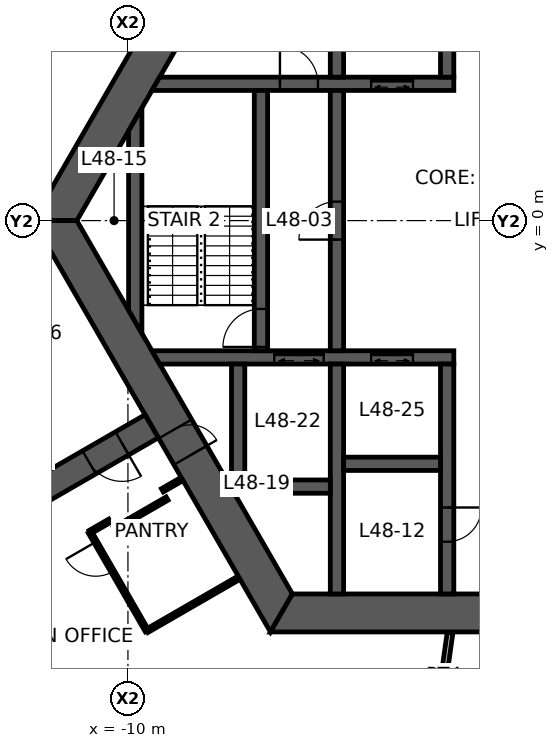
"""IFC4 building model, lengths in metres.
Left out: names, types, materials, properties, quantities, classifications, styles, units other than length and angle.
Written with IfcOpenShell. Run it as: python <this file> out.ifc"""

import sys

from ifc_helpers import new_model, si_unit, direction, frame, frame_2d, origin, place, context, subcontext, project, spatial, polyline, rectangle, outline, extrude, element, fill, save


model = new_model("IFC4")
c1 = context("Model", 3, precision=1e-05, world=origin(), true_north=direction((0.0, 1.0)))
c2 = subcontext(c1, "Body", "Model", "MODEL_VIEW")
j1 = project(units=[si_unit("LENGTHUNIT", "METRE"), si_unit("PLANEANGLEUNIT", "RADIAN")], contexts=[c1])
p1 = place(None, origin())
s1 = spatial("IfcSite", under=j1, at=p1, CompositionType="ELEMENT")
p2 = place(p1, origin())
s2 = spatial("IfcBuilding", under=s1, at=p2, CompositionType="ELEMENT")
p3 = place(p2, frame((0.0, 0.0, 191.6)))
s3 = spatial("IfcBuildingStorey", under=s2, at=p3, CompositionType="ELEMENT", Elevation=191.6)
p4 = place(p3, frame((-5.961, 10.325, 0.0), z_axis=(0.0, 0.0, 1.0), x_axis=(-0.500004296715, -0.866022923061, 0.0)))
e1 = element("IfcWall", 1, at=p4, inside=s3, PredefinedType="SHEAR", context=c2, shape_type="SweptSolid", body=[
    extrude(outline(polyline([(-0.289, -0.5), (4.494, -0.5), (5.494, -0.5), (12.211, -0.5), (11.634, 0.5), (5.494, 0.5), (4.494, 0.5), (0.289, 0.5), (-0.289, -0.5)])), origin(), (0.0, 0.0, 1.0), 3.9),
])
p5 = place(p4, frame((4.494, 0.0, 0.0)))
e2 = element("IfcOpeningElement", 2, at=p5, cuts=e1, PredefinedType="OPENING", context=c2, shape_type="SweptSolid", body=[
    extrude(rectangle(XDim=1.0, YDim=2.1, at=frame_2d((0.5, 1.05))), frame((0.0, 0.51, 0.0), z_axis=(0.0, -1.0, 0.0), x_axis=(1.0, 0.0, 0.0)), (0.0, 0.0, 1.0), 1.02),
])
p6 = place(p3, frame((-11.922, 0.0, 0.0), z_axis=(0.0, 0.0, 1.0), x_axis=(0.500004296715, -0.866022923061, 0.0)))
e3 = element("IfcWall", 3, at=p6, inside=s3, PredefinedType="SHEAR", context=c2, shape_type="SweptSolid", body=[
    extrude(outline(polyline([(-0.289, -0.5), (6.331, -0.5), (7.131, -0.5), (12.211, -0.5), (11.634, 0.5), (7.131, 0.5), (6.331, 0.5), (0.289, 0.5), (-0.289, -0.5)])), origin(), (0.0, 0.0, 1.0), 3.9),
])
p7 = place(p6, frame((6.331, 0.0, 0.0)))
e4 = element("IfcOpeningElement", 4, at=p7, cuts=e3, PredefinedType="OPENING", context=c2, shape_type="SweptSolid", body=[
    extrude(rectangle(XDim=0.8, YDim=2.1, at=frame_2d((0.4, 1.05))), frame((0.0, 0.51, 0.0), z_axis=(0.0, -1.0, 0.0), x_axis=(1.0, 0.0, 0.0)), (0.0, 0.0, 1.0), 1.02),
])
p8 = place(p3, frame((-5.961, -10.325, 0.0), z_axis=(0.0, 0.0, 1.0), x_axis=(1.0, 0.0, 0.0)))
e5 = element("IfcWall", 5, at=p8, inside=s3, PredefinedType="SHEAR", context=c2, shape_type="SweptSolid", body=[
    extrude(outline(polyline([(-0.289, -0.5), (5.461, -0.5), (6.461, -0.5), (12.211, -0.5), (11.634, 0.5), (6.461, 0.5), (5.461, 0.5), (0.289, 0.5), (-0.289, -0.5)])), origin(), (0.0, 0.0, 1.0), 3.9),
])
p9 = place(p8, frame((5.461, 0.0, 0.0)))
e6 = element("IfcOpeningElement", 6, at=p9, cuts=e5, PredefinedType="OPENING", context=c2, shape_type="SweptSolid", body=[
    extrude(rectangle(XDim=1.0, YDim=2.1, at=frame_2d((0.5, 1.05))), frame((0.0, 0.51, 0.0), z_axis=(0.0, -1.0, 0.0), x_axis=(1.0, 0.0, 0.0)), (0.0, 0.0, 1.0), 1.02),
])
p10 = place(p3, frame((-9.375, -5.413, 0.0), z_axis=(0.0, 0.0, 1.0), x_axis=(-0.866032377459, -0.499987921047, 0.0)))
e7 = element("IfcWall", 7, at=p10, inside=s3, PredefinedType="SHEAR", context=c2, shape_type="SweptSolid", body=[
    extrude(rectangle(XDim=7.696, YDim=0.7, at=frame_2d((3.848, 0.0))), origin(), (0.0, 0.0, 1.0), 3.9),
])
p11 = place(p10, frame((0.9, 0.0, 0.0)))
e8 = element("IfcOpeningElement", 8, at=p11, cuts=e7, PredefinedType="OPENING", context=c2, shape_type="SweptSolid", body=[
    extrude(rectangle(XDim=1.0, YDim=2.1, at=frame_2d((0.5, 1.05))), frame((0.0, 0.36, 0.0), z_axis=(0.0, -1.0, 0.0), x_axis=(1.0, 0.0, 0.0)), (0.0, 0.0, 1.0), 0.72),
])
p12 = place(p3, frame((-9.266, 3.6, 0.0), z_axis=(0.0, 0.0, 1.0), x_axis=(1.0, 0.0, 0.0)))
e9 = element("IfcWall", 9, at=p12, inside=s3, PredefinedType="SHEAR", context=c2, shape_type="SweptSolid", body=[
    extrude(outline(polyline([(-0.101, -0.175), (3.266, -0.175), (4.266, -0.175), (5.667, -0.175), (6.767, -0.175), (7.841, -0.175), (7.841, 0.175), (6.767, 0.175), (5.667, 0.175), (4.266, 0.175), (3.266, 0.175), (0.101, 0.175), (-0.101, -0.175)])), origin(), (0.0, 0.0, 1.0), 3.9),
])
p13 = place(p12, frame((3.266, 0.0, 0.0)))
e10 = element("IfcOpeningElement", 10, at=p13, cuts=e9, PredefinedType="OPENING", context=c2, shape_type="SweptSolid", body=[
    extrude(rectangle(XDim=1.0, YDim=2.1, at=frame_2d((0.5, 1.05))), frame((0.0, 0.185, 0.0), z_axis=(0.0, -1.0, 0.0), x_axis=(1.0, 0.0, 0.0)), (0.0, 0.0, 1.0), 0.37),
])
p14 = place(p12, frame((5.667, 0.0, 0.0)))
e11 = element("IfcOpeningElement", 11, at=p14, cuts=e9, PredefinedType="OPENING", context=c2, shape_type="SweptSolid", body=[
    extrude(rectangle(XDim=1.1, YDim=2.1, at=frame_2d((0.55, 1.05))), frame((0.0, 0.185, 0.0), z_axis=(0.0, -1.0, 0.0), x_axis=(1.0, 0.0, 0.0)), (0.0, 0.0, 1.0), 0.37),
])
p15 = place(p3, frame((-9.266, -3.6, 0.0), z_axis=(0.0, 0.0, 1.0), x_axis=(1.0, 0.0, 0.0)))
e12 = element("IfcWall", 12, at=p15, inside=s3, PredefinedType="SHEAR", context=c2, shape_type="SweptSolid", body=[
    extrude(outline(polyline([(0.101, -0.175), (3.116, -0.175), (4.417, -0.175), (5.667, -0.175), (6.767, -0.175), (7.841, -0.175), (7.841, 0.175), (6.767, 0.175), (5.667, 0.175), (4.417, 0.175), (3.116, 0.175), (-0.101, 0.175), (0.101, -0.175)])), origin(), (0.0, 0.0, 1.0), 3.9),
])
p16 = place(p15, frame((5.667, 0.0, 0.0)))
e13 = element("IfcOpeningElement", 13, at=p16, cuts=e12, PredefinedType="OPENING", context=c2, shape_type="SweptSolid", body=[
    extrude(rectangle(XDim=1.1, YDim=2.1, at=frame_2d((0.55, 1.05))), frame((0.0, 0.185, 0.0), z_axis=(0.0, -1.0, 0.0), x_axis=(1.0, 0.0, 0.0)), (0.0, 0.0, 1.0), 0.37),
])
p17 = place(p15, frame((3.116, 0.0, 0.0)))
e14 = element("IfcOpeningElement", 14, at=p17, cuts=e12, PredefinedType="OPENING", context=c2, shape_type="SweptSolid", body=[
    extrude(rectangle(XDim=1.3, YDim=2.1, at=frame_2d((0.65, 1.05))), frame((0.0, 0.185, 0.0), z_axis=(0.0, -1.0, 0.0), x_axis=(1.0, 0.0, 0.0)), (0.0, 0.0, 1.0), 0.37),
])
p18 = place(p3, frame((-1.6, 3.775, 0.0), z_axis=(0.0, 0.0, 1.0), x_axis=(0.0, 1.0, 0.0)))
e15 = element("IfcWall", 15, at=p18, inside=s3, PredefinedType="SHEAR", context=c2, shape_type="SweptSolid", body=[
    extrude(rectangle(XDim=6.05, YDim=0.35, at=frame_2d((3.025, 0.0))), origin(), (0.0, 0.0, 1.0), 3.9),
])
p19 = place(p18, frame((3.775, 0.0, 0.0)))
e16 = element("IfcOpeningElement", 16, at=p19, cuts=e15, PredefinedType="OPENING", context=c2, shape_type="SweptSolid", body=[
    extrude(rectangle(XDim=0.9, YDim=2.1, at=frame_2d((0.45, 1.05))), frame((0.0, 0.185, 0.0), z_axis=(0.0, -1.0, 0.0), x_axis=(1.0, 0.0, 0.0)), (0.0, 0.0, 1.0), 0.37),
])
p20 = place(p3, frame((-1.6, -3.775, 0.0), z_axis=(0.0, 0.0, 1.0), x_axis=(0.0, -1.0, 0.0)))
e17 = element("IfcWall", 17, at=p20, inside=s3, PredefinedType="SHEAR", context=c2, shape_type="SweptSolid", body=[
    extrude(rectangle(XDim=6.05, YDim=0.35, at=frame_2d((3.025, 0.0))), origin(), (0.0, 0.0, 1.0), 3.9),
])
p21 = place(p20, frame((3.775, 0.0, 0.0)))
e18 = element("IfcOpeningElement", 18, at=p21, cuts=e17, PredefinedType="OPENING", context=c2, shape_type="SweptSolid", body=[
    extrude(rectangle(XDim=0.9, YDim=2.1, at=frame_2d((0.45, 1.05))), frame((0.0, 0.185, 0.0), z_axis=(0.0, -1.0, 0.0), x_axis=(1.0, 0.0, 0.0)), (0.0, 0.0, 1.0), 0.37),
])
p22 = place(p3, frame((-4.5, -3.425, 0.0), z_axis=(0.0, 0.0, 1.0), x_axis=(0.0, 1.0, 0.0)))
e19 = element("IfcWall", 19, at=p22, inside=s3, PredefinedType="SHEAR", context=c2, shape_type="SweptSolid", body=[
    extrude(rectangle(XDim=6.85, YDim=0.35, at=frame_2d((3.425, 0.0))), origin(), (0.0, 0.0, 1.0), 3.9),
])
p23 = place(p22, frame((2.925, 0.0, 0.0)))
e20 = element("IfcOpeningElement", 20, at=p23, cuts=e19, PredefinedType="OPENING", context=c2, shape_type="SweptSolid", body=[
    extrude(rectangle(XDim=1.0, YDim=2.1, at=frame_2d((0.5, 1.05))), frame((0.0, 0.185, 0.0), z_axis=(0.0, -1.0, 0.0), x_axis=(1.0, 0.0, 0.0)), (0.0, 0.0, 1.0), 0.37),
])
p24 = place(p3, frame((-6.5, -3.425, 0.0), z_axis=(0.0, 0.0, 1.0), x_axis=(0.0, 1.0, 0.0)))
e21 = element("IfcWall", 21, at=p24, inside=s3, PredefinedType="SHEAR", context=c2, shape_type="SweptSolid", body=[
    extrude(rectangle(XDim=6.85, YDim=0.35, at=frame_2d((3.425, 0.0))), origin(), (0.0, 0.0, 1.0), 3.9),
])
p25 = place(p24, frame((0.1, 0.0, 0.0)))
e22 = element("IfcOpeningElement", 22, at=p25, cuts=e21, PredefinedType="OPENING", context=c2, shape_type="SweptSolid", body=[
    extrude(rectangle(XDim=1.0, YDim=2.1, at=frame_2d((0.5, 1.05))), frame((0.0, 0.185, 0.0), z_axis=(0.0, -1.0, 0.0), x_axis=(1.0, 0.0, 0.0)), (0.0, 0.0, 1.0), 0.37),
])
for number, where, z_axis, x_axis in (
    (23, (-4.5, 3.775, 0.0), (0.0, 0.0, 1.0), (0.0, 1.0, 0.0)),
    (24, (-4.5, -3.775, 0.0), (0.0, 0.0, 1.0), (0.0, -1.0, 0.0)),
):
    element("IfcWall", number, at=place(p3, frame(where, z_axis=z_axis, x_axis=x_axis)), inside=s3, PredefinedType="SHEAR", context=c2, shape_type="SweptSolid", body=[
        extrude(rectangle(XDim=6.05, YDim=0.35, at=frame_2d((3.025, 0.0))), origin(), (0.0, 0.0, 1.0), 3.9),
    ])
p26 = place(p3, frame((-4.325, -6.4, 0.0), z_axis=(0.0, 0.0, 1.0), x_axis=(1.0, 0.0, 0.0)))
e25 = element("IfcWall", 25, at=p26, inside=s3, PredefinedType="SHEAR", context=c2, shape_type="SweptSolid", body=[
    extrude(rectangle(XDim=2.55, YDim=0.35, at=frame_2d((1.275, 0.0))), origin(), (0.0, 0.0, 1.0), 3.9),
])
p27 = place(p3, frame((-6.925, -7.0, 0.0), z_axis=(0.0, 0.0, 1.0), x_axis=(1.0, 0.0, 0.0)))
e26 = element("IfcWall", 26, at=p27, inside=s3, PredefinedType="SHEAR", context=c2, shape_type="SweptSolid", body=[
    extrude(rectangle(XDim=2.25, YDim=0.35, at=frame_2d((1.125, 0.0))), origin(), (0.0, 0.0, 1.0), 3.9),
])
p28 = place(p3, frame((-7.1, -3.775, 0.0), z_axis=(0.0, 0.0, 1.0), x_axis=(0.0, -1.0, 0.0)))
e27 = element("IfcWall", 27, at=p28, inside=s3, PredefinedType="SHEAR", context=c2, shape_type="SweptSolid", body=[
    extrude(outline(polyline([(0.0, -0.175), (3.274, -0.175), (3.4, 0.0), (3.4, 0.175), (0.0, 0.175), (0.0, -0.175)])), origin(), (0.0, 0.0, 1.0), 3.9),
])
p29 = place(p3, frame((-9.808, -2.662, 0.0), z_axis=(0.0, 0.0, 1.0), x_axis=(0.0, 1.0, 0.0)))
e28 = element("IfcWall", 28, at=p29, inside=s3, PredefinedType="SHEAR", context=c2, shape_type="SweptSolid", body=[
    extrude(outline(polyline([(-0.303, -0.175), (5.628, -0.175), (5.021, 0.175), (0.303, 0.175), (-0.303, -0.175)])), origin(), (0.0, 0.0, 1.0), 3.9),
])
p30 = place(p3, frame((-15.156, 0.0, 0.0), z_axis=(0.0, 0.0, 1.0), x_axis=(0.500012970505, 0.86601791513, 0.0)))
e29 = element("IfcWall", 29, at=p30, inside=s3, PredefinedType="PARTITIONING", context=c2, shape_type="SweptSolid", body=[
    extrude(rectangle(XDim=11.591, YDim=0.15, at=frame_2d((5.795, 0.0))), origin(), (0.0, 0.0, 1.0), 2.95),
])
p31 = place(p30, frame((5.295, 0.0, 0.0)))
e30 = element("IfcOpeningElement", 30, at=p31, cuts=e29, PredefinedType="OPENING", context=c2, shape_type="SweptSolid", body=[
    extrude(rectangle(XDim=1.0, YDim=2.1, at=frame_2d((0.5, 1.05))), frame((0.0, 0.085, 0.0), z_axis=(0.0, -1.0, 0.0), x_axis=(1.0, 0.0, 0.0)), (0.0, 0.0, 1.0), 0.17),
])
p32 = place(p3, frame((-11.0, -8.198, 0.0), z_axis=(0.0, 0.0, 1.0), x_axis=(0.866131372301, 0.499816412211, 0.0)))
e31 = element("IfcWall", 31, at=p32, inside=s3, PredefinedType="PARTITIONING", context=c2, shape_type="SweptSolid", body=[
    extrude(rectangle(XDim=0.6, YDim=0.1, at=frame_2d((0.3, 0.0))), origin(), (0.0, 0.0, 1.0), 2.95),
])
p33 = place(p3, frame((-10.355, -8.115, 0.0), z_axis=(0.0, 0.0, 1.0), x_axis=(0.866094119867, 0.499880961361, 0.0)))
e32 = element("IfcWall", 32, at=p33, inside=s3, PredefinedType="PARTITIONING", context=c2, shape_type="SweptSolid", body=[
    extrude(rectangle(XDim=1.6, YDim=0.1, at=frame_2d((0.8, 0.0))), origin(), (0.0, 0.0, 1.0), 2.95),
])
p34 = place(p3, frame((-9.5, -10.796, 0.0), z_axis=(0.0, 0.0, 1.0), x_axis=(-0.499990139034, 0.866031096941, 0.0)))
e33 = element("IfcWall", 33, at=p34, inside=s3, PredefinedType="PARTITIONING", context=c2, shape_type="SweptSolid", body=[
    extrude(rectangle(XDim=3.0, YDim=0.1, at=frame_2d((1.5, 0.0))), origin(), (0.0, 0.0, 1.0), 2.95),
])
p35 = place(p34, frame((1.8, 0.0, 0.0)))
e34 = element("IfcOpeningElement", 34, at=p35, cuts=e33, PredefinedType="OPENING", context=c2, shape_type="SweptSolid", body=[
    extrude(rectangle(XDim=0.9, YDim=2.1, at=frame_2d((0.45, 1.05))), frame((0.0, 0.06, 0.0), z_axis=(0.0, -1.0, 0.0), x_axis=(1.0, 0.0, 0.0)), (0.0, 0.0, 1.0), 0.12),
])
p36 = place(p3, frame((-9.094, -7.098, 0.0), z_axis=(0.0, 0.0, 1.0), x_axis=(0.865954211699, 0.50012328804, 0.0)))
e35 = element("IfcWall", 35, at=p36, inside=s3, PredefinedType="PARTITIONING", context=c2, shape_type="SweptSolid", body=[
    extrude(rectangle(XDim=0.58, YDim=0.1, at=frame_2d((0.29, 0.0))), origin(), (0.0, 0.0, 1.0), 2.95),
])
p37 = place(p3, frame((-7.092, -9.406, 0.0), z_axis=(0.0, 0.0, 1.0), x_axis=(-0.86603494908, -0.499983466698, 0.0)))
e36 = element("IfcWall", 36, at=p37, inside=s3, PredefinedType="PARTITIONING", context=c2, shape_type="SweptSolid", body=[
    extrude(rectangle(XDim=2.78, YDim=0.1, at=frame_2d((1.39, 0.0))), origin(), (0.0, 0.0, 1.0), 2.95),
])
p38 = place(p3, frame((-1.844, -13.125, 0.0), z_axis=(0.0, 0.0, 1.0), x_axis=(0.139119980631, 0.990275532864, 0.0)))
e37 = element("IfcWall", 37, at=p38, inside=s3, PredefinedType="PARTITIONING", context=c2, shape_type="SweptSolid", body=[
    extrude(rectangle(XDim=2.302, YDim=0.15, at=frame_2d((1.151, 0.0))), origin(), (0.0, 0.0, 1.0), 2.95),
])
p39 = place(p7, origin())
e38 = element("IfcDoor", 38, at=p39, inside=s3, OperationType="SINGLE_SWING_RIGHT", PredefinedType="DOOR", context=c2, shape_type="SweptSolid", body=[
    extrude(rectangle(XDim=0.8, YDim=2.1, at=frame_2d((0.4, 1.05))), frame((0.0, 0.025, 0.0), z_axis=(0.0, -1.0, 0.0), x_axis=(1.0, 0.0, 0.0)), (0.0, 0.0, 1.0), 0.05),
])
fill(e4, e38)
p40 = place(p23, origin())
e39 = element("IfcDoor", 39, at=p40, inside=s3, OperationType="SINGLE_SWING_LEFT", PredefinedType="DOOR", context=c2, shape_type="SweptSolid", body=[
    extrude(rectangle(XDim=1.0, YDim=2.1, at=frame_2d((0.5, 1.05))), frame((0.0, 0.025, 0.0), z_axis=(0.0, -1.0, 0.0), x_axis=(1.0, 0.0, 0.0)), (0.0, 0.0, 1.0), 0.05),
])
fill(e20, e39)
p41 = place(p25, origin())
e40 = element("IfcDoor", 40, at=p41, inside=s3, OperationType="SINGLE_SWING_LEFT", PredefinedType="DOOR", context=c2, shape_type="SweptSolid", body=[
    extrude(rectangle(XDim=1.0, YDim=2.1, at=frame_2d((0.5, 1.05))), frame((0.0, 0.025, 0.0), z_axis=(0.0, -1.0, 0.0), x_axis=(1.0, 0.0, 0.0)), (0.0, 0.0, 1.0), 0.05),
])
fill(e22, e40)
p42 = place(p13, origin())
e41 = element("IfcDoor", 41, at=p42, inside=s3, OperationType="SINGLE_SWING_LEFT", PredefinedType="DOOR", context=c2, shape_type="SweptSolid", body=[
    extrude(rectangle(XDim=1.0, YDim=2.1, at=frame_2d((0.5, 1.05))), frame((0.0, 0.025, 0.0), z_axis=(0.0, -1.0, 0.0), x_axis=(1.0, 0.0, 0.0)), (0.0, 0.0, 1.0), 0.05),
])
fill(e10, e41)
p43 = place(p21, origin())
e42 = element("IfcDoor", 42, at=p43, inside=s3, OperationType="SINGLE_SWING_LEFT", PredefinedType="DOOR", context=c2, shape_type="SweptSolid", body=[
    extrude(rectangle(XDim=0.9, YDim=2.1, at=frame_2d((0.45, 1.05))), frame((0.0, 0.025, 0.0), z_axis=(0.0, -1.0, 0.0), x_axis=(1.0, 0.0, 0.0)), (0.0, 0.0, 1.0), 0.05),
])
fill(e18, e42)
p44 = place(p11, origin())
e43 = element("IfcDoor", 43, at=p44, inside=s3, OperationType="SINGLE_SWING_LEFT", PredefinedType="DOOR", context=c2, shape_type="SweptSolid", body=[
    extrude(rectangle(XDim=1.0, YDim=2.1, at=frame_2d((0.5, 1.05))), frame((0.0, 0.025, 0.0), z_axis=(0.0, -1.0, 0.0), x_axis=(1.0, 0.0, 0.0)), (0.0, 0.0, 1.0), 0.05),
])
fill(e8, e43)
p45 = place(p35, origin())
e44 = element("IfcDoor", 44, at=p45, inside=s3, OperationType="SINGLE_SWING_RIGHT", PredefinedType="DOOR", context=c2, shape_type="SweptSolid", body=[
    extrude(rectangle(XDim=0.9, YDim=2.1, at=frame_2d((0.45, 1.05))), frame((0.0, 0.025, 0.0), z_axis=(0.0, -1.0, 0.0), x_axis=(1.0, 0.0, 0.0)), (0.0, 0.0, 1.0), 0.05),
])
fill(e34, e44)
p46 = place(p14, origin())
e45 = element("IfcDoor", 45, at=p46, inside=s3, OperationType="DOUBLE_DOOR_SLIDING", PredefinedType="DOOR", context=c2, shape_type="SweptSolid", body=[
    extrude(rectangle(XDim=1.1, YDim=2.1, at=frame_2d((0.55, 1.05))), frame((0.0, 0.025, 0.0), z_axis=(0.0, -1.0, 0.0), x_axis=(1.0, 0.0, 0.0)), (0.0, 0.0, 1.0), 0.05),
])
fill(e11, e45)
p47 = place(p16, origin())
e46 = element("IfcDoor", 46, at=p47, inside=s3, OperationType="DOUBLE_DOOR_SLIDING", PredefinedType="DOOR", context=c2, shape_type="SweptSolid", body=[
    extrude(rectangle(XDim=1.1, YDim=2.1, at=frame_2d((0.55, 1.05))), frame((0.0, 0.025, 0.0), z_axis=(0.0, -1.0, 0.0), x_axis=(1.0, 0.0, 0.0)), (0.0, 0.0, 1.0), 0.05),
])
fill(e13, e46)
p48 = place(p17, origin())
e47 = element("IfcDoor", 47, at=p48, inside=s3, OperationType="DOUBLE_DOOR_SLIDING", PredefinedType="DOOR", context=c2, shape_type="SweptSolid", body=[
    extrude(rectangle(XDim=1.3, YDim=2.1, at=frame_2d((0.65, 1.05))), frame((0.0, 0.025, 0.0), z_axis=(0.0, -1.0, 0.0), x_axis=(1.0, 0.0, 0.0)), (0.0, 0.0, 1.0), 0.05),
])
fill(e14, e47)
save(model, sys.argv[1])
